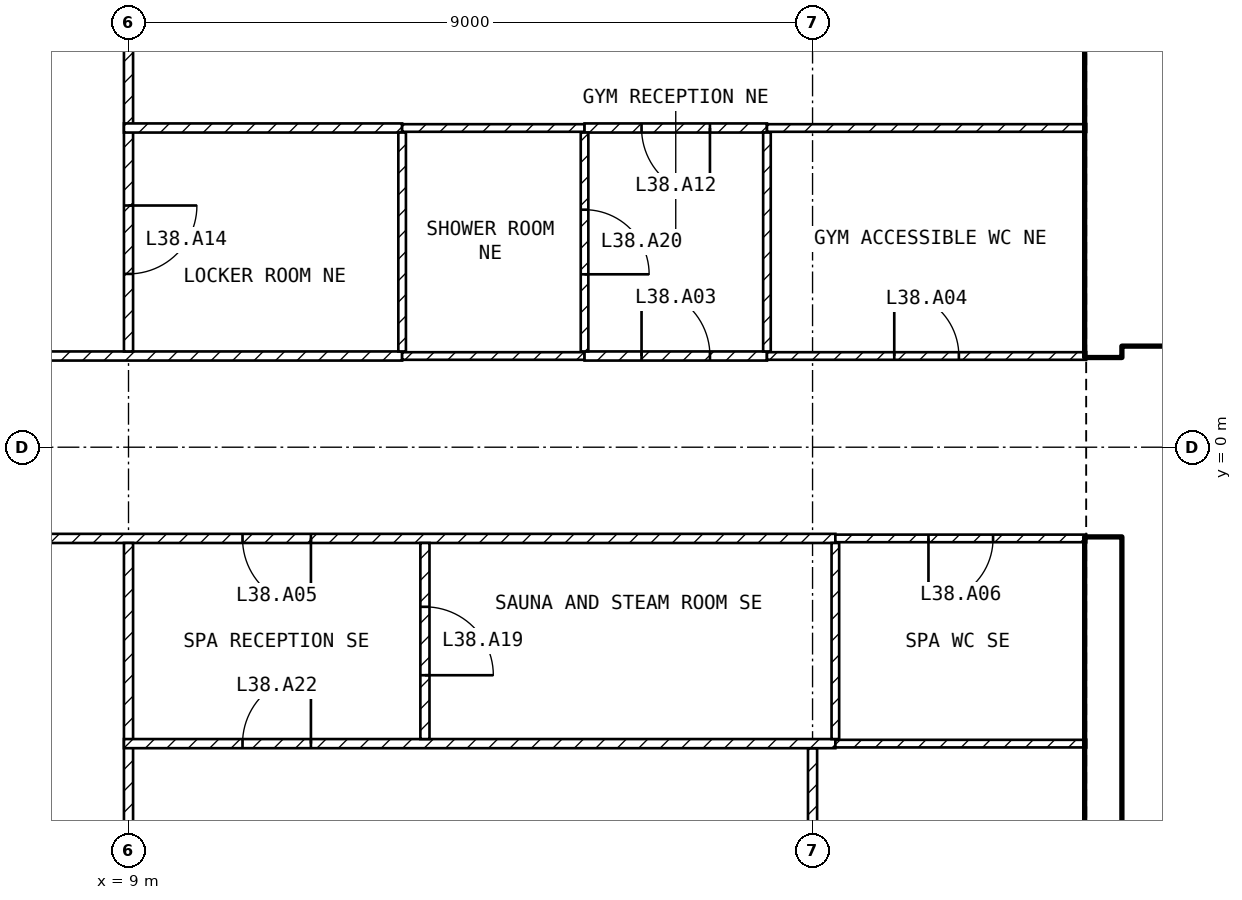
"""IFC4 building model, lengths in metres.
Left out: names, types, materials, properties, quantities, classifications, styles, units other than length and angle.
Written with IfcOpenShell. Run it as: python <this file> out.ifc"""

import sys

from ifc_helpers import new_model, si_unit, direction, frame, frame_2d, origin, place, context, subcontext, project, spatial, rectangle, extrude, element, fill, save


model = new_model("IFC4")
c1 = context("Model", 3, precision=1e-05, world=origin(), true_north=direction((0.0, 1.0)))
c2 = subcontext(c1, "Body", "Model", "MODEL_VIEW")
j1 = project(units=[si_unit("LENGTHUNIT", "METRE"), si_unit("PLANEANGLEUNIT", "RADIAN")], contexts=[c1])
p1 = place(None, origin())
s1 = spatial("IfcSite", under=j1, at=p1, CompositionType="ELEMENT")
p2 = place(p1, origin())
s2 = spatial("IfcBuilding", under=s1, at=p2, CompositionType="ELEMENT")
p3 = place(p2, frame((0.0, 0.0, 154.9)))
s3 = spatial("IfcBuildingStorey", under=s2, at=p3, CompositionType="ELEMENT", Elevation=154.9)
for number, where, z_axis, x_axis in (
    (1, (21.825, -8.1, 0.0), (0.0, 0.0, 1.0), (0.0, 1.0, 0.0)),
    (2, (21.825, 1.2, 0.0), (0.0, 0.0, 1.0), (0.0, 1.0, 0.0)),
):
    element("IfcWall", number, at=place(p3, frame(where, z_axis=z_axis, x_axis=x_axis)), inside=s3, PredefinedType="SHEAR", context=c2, shape_type="SweptSolid", body=[
        extrude(rectangle(XDim=6.9, YDim=0.45, at=frame_2d((3.45, 0.0))), origin(), (0.0, 0.0, 1.0), 6.75),
    ])
p4 = place(p3, frame((22.05, 1.45, 0.0), z_axis=(0.0, 0.0, 1.0), x_axis=(1.0, 0.0, 0.0)))
e3 = element("IfcWall", 3, at=p4, inside=s3, PredefinedType="SOLIDWALL", context=c2, shape_type="SweptSolid", body=[
    extrude(rectangle(XDim=11.0, YDim=0.2, at=frame_2d((5.5, 0.0))), origin(), (0.0, 0.0, 1.0), 6.75),
])
p5 = place(p4, frame((0.75, 0.0, 0.0)))
e4 = element("IfcOpeningElement", 4, at=p5, cuts=e3, PredefinedType="OPENING", context=c2, shape_type="SweptSolid", body=[
    extrude(rectangle(XDim=1.0, YDim=2.1, at=frame_2d((0.5, 1.05))), frame((0.0, 0.11, 0.0), z_axis=(0.0, -1.0, 0.0), x_axis=(1.0, 0.0, 0.0)), (0.0, 0.0, 1.0), 0.22),
])
p6 = place(p4, frame((3.25, 0.0, 0.0)))
e5 = element("IfcOpeningElement", 5, at=p6, cuts=e3, PredefinedType="OPENING", context=c2, shape_type="SweptSolid", body=[
    extrude(rectangle(XDim=1.0, YDim=2.1, at=frame_2d((0.5, 1.05))), frame((0.0, 0.11, 0.0), z_axis=(0.0, -1.0, 0.0), x_axis=(1.0, 0.0, 0.0)), (0.0, 0.0, 1.0), 0.22),
])
p7 = place(p4, frame((9.075, 0.0, 0.0)))
e6 = element("IfcOpeningElement", 6, at=p7, cuts=e3, PredefinedType="OPENING", context=c2, shape_type="SweptSolid", body=[
    extrude(rectangle(XDim=0.9, YDim=2.1, at=frame_2d((0.45, 1.05))), frame((0.0, 0.11, 0.0), z_axis=(0.0, -1.0, 0.0), x_axis=(1.0, 0.0, 0.0)), (0.0, 0.0, 1.0), 0.22),
])
p8 = place(p3, frame((22.05, 5.15, 0.0), z_axis=(0.0, 0.0, 1.0), x_axis=(1.0, 0.0, 0.0)))
e7 = element("IfcWall", 7, at=p8, inside=s3, PredefinedType="SOLIDWALL", context=c2, shape_type="SweptSolid", body=[
    extrude(rectangle(XDim=6.3, YDim=0.2, at=frame_2d((3.15, 0.0))), origin(), (0.0, 0.0, 1.0), 6.75),
])
p9 = place(p8, frame((0.2, 0.0, 0.0)))
e8 = element("IfcOpeningElement", 8, at=p9, cuts=e7, PredefinedType="OPENING", context=c2, shape_type="SweptSolid", body=[
    extrude(rectangle(XDim=1.0, YDim=2.1, at=frame_2d((0.5, 1.05))), frame((0.0, 0.11, 0.0), z_axis=(0.0, -1.0, 0.0), x_axis=(1.0, 0.0, 0.0)), (0.0, 0.0, 1.0), 0.22),
])
p10 = place(p3, frame((-21.6, 1.2, 0.0), z_axis=(0.0, 0.0, 1.0), x_axis=(1.0, 0.0, 0.0)))
e9 = element("IfcWall", 9, at=p10, inside=s3, PredefinedType="PARTITIONING", context=c2, shape_type="SweptSolid", body=[
    extrude(rectangle(XDim=34.2, YDim=0.12, at=frame_2d((17.1, 0.0))), origin(), (0.0, 0.0, 1.0), 6.75),
])
p11 = place(p10, frame((20.7, 0.0, 0.0)))
e10 = element("IfcOpeningElement", 10, at=p11, cuts=e9, PredefinedType="OPENING", context=c2, shape_type="SweptSolid", body=[
    extrude(rectangle(XDim=1.8, YDim=2.1, at=frame_2d((0.9, 1.05))), frame((0.0, 0.07, 0.0), z_axis=(0.0, -1.0, 0.0), x_axis=(1.0, 0.0, 0.0)), (0.0, 0.0, 1.0), 0.14),
])
p12 = place(p10, frame((6.45, 0.0, 0.0)))
e11 = element("IfcOpeningElement", 11, at=p12, cuts=e9, PredefinedType="OPENING", context=c2, shape_type="SweptSolid", body=[
    extrude(rectangle(XDim=0.9, YDim=2.1, at=frame_2d((0.45, 1.05))), frame((0.0, 0.07, 0.0), z_axis=(0.0, -1.0, 0.0), x_axis=(1.0, 0.0, 0.0)), (0.0, 0.0, 1.0), 0.14),
])
p13 = place(p3, frame((18.3, -1.2, 0.0), z_axis=(0.0, 0.0, 1.0), x_axis=(-1.0, 0.0, 0.0)))
e12 = element("IfcWall", 12, at=p13, inside=s3, PredefinedType="PARTITIONING", context=c2, shape_type="SweptSolid", body=[
    extrude(rectangle(XDim=36.3, YDim=0.12, at=frame_2d((18.15, 0.0))), origin(), (0.0, 0.0, 1.0), 6.75),
])
p14 = place(p13, frame((17.4, 0.0, 0.0)))
e13 = element("IfcOpeningElement", 13, at=p14, cuts=e12, PredefinedType="OPENING", context=c2, shape_type="SweptSolid", body=[
    extrude(rectangle(XDim=1.8, YDim=2.1, at=frame_2d((0.9, 1.05))), frame((0.0, 0.07, 0.0), z_axis=(0.0, -1.0, 0.0), x_axis=(1.0, 0.0, 0.0)), (0.0, 0.0, 1.0), 0.14),
])
p15 = place(p13, frame((6.9, 0.0, 0.0)))
e14 = element("IfcOpeningElement", 14, at=p15, cuts=e12, PredefinedType="OPENING", context=c2, shape_type="SweptSolid", body=[
    extrude(rectangle(XDim=0.9, YDim=2.1, at=frame_2d((0.45, 1.05))), frame((0.0, 0.07, 0.0), z_axis=(0.0, -1.0, 0.0), x_axis=(1.0, 0.0, 0.0)), (0.0, 0.0, 1.0), 0.14),
])
p16 = place(p13, frame((30.15, 0.0, 0.0)))
e15 = element("IfcOpeningElement", 15, at=p16, cuts=e12, PredefinedType="OPENING", context=c2, shape_type="SweptSolid", body=[
    extrude(rectangle(XDim=0.9, YDim=2.1, at=frame_2d((0.45, 1.05))), frame((0.0, 0.07, 0.0), z_axis=(0.0, -1.0, 0.0), x_axis=(1.0, 0.0, 0.0)), (0.0, 0.0, 1.0), 0.14),
])
p17 = place(p3, frame((12.6, 1.2, 0.0), z_axis=(0.0, 0.0, 1.0), x_axis=(1.0, 0.0, 0.0)))
e16 = element("IfcWall", 16, at=p17, inside=s3, PredefinedType="PARTITIONING", context=c2, shape_type="SweptSolid", body=[
    extrude(rectangle(XDim=2.4, YDim=0.1, at=frame_2d((1.2, 0.0))), origin(), (0.0, 0.0, 1.0), 6.75),
])
p18 = place(p3, frame((15.0, 1.2, 0.0), z_axis=(0.0, 0.0, 1.0), x_axis=(1.0, 0.0, 0.0)))
e17 = element("IfcWall", 17, at=p18, inside=s3, PredefinedType="PARTITIONING", context=c2, shape_type="SweptSolid", body=[
    extrude(rectangle(XDim=2.4, YDim=0.12, at=frame_2d((1.2, 0.0))), origin(), (0.0, 0.0, 1.0), 6.75),
])
p19 = place(p18, frame((0.75, 0.0, 0.0)))
e18 = element("IfcOpeningElement", 18, at=p19, cuts=e17, PredefinedType="OPENING", context=c2, shape_type="SweptSolid", body=[
    extrude(rectangle(XDim=0.9, YDim=2.1, at=frame_2d((0.45, 1.05))), frame((0.0, 0.07, 0.0), z_axis=(0.0, -1.0, 0.0), x_axis=(1.0, 0.0, 0.0)), (0.0, 0.0, 1.0), 0.14),
])
p20 = place(p3, frame((17.4, 1.2, 0.0), z_axis=(0.0, 0.0, 1.0), x_axis=(1.0, 0.0, 0.0)))
e19 = element("IfcWall", 19, at=p20, inside=s3, PredefinedType="PARTITIONING", context=c2, shape_type="SweptSolid", body=[
    extrude(rectangle(XDim=4.2, YDim=0.1, at=frame_2d((2.1, 0.0))), origin(), (0.0, 0.0, 1.0), 6.75),
])
p21 = place(p20, frame((1.675, 0.0, 0.0)))
e20 = element("IfcOpeningElement", 20, at=p21, cuts=e19, PredefinedType="OPENING", context=c2, shape_type="SweptSolid", body=[
    extrude(rectangle(XDim=0.85, YDim=2.1, at=frame_2d((0.425, 1.05))), frame((0.0, 0.06, 0.0), z_axis=(0.0, -1.0, 0.0), x_axis=(1.0, 0.0, 0.0)), (0.0, 0.0, 1.0), 0.12),
])
p22 = place(p3, frame((21.6, -1.2, 0.0), z_axis=(0.0, 0.0, 1.0), x_axis=(-1.0, 0.0, 0.0)))
e21 = element("IfcWall", 21, at=p22, inside=s3, PredefinedType="PARTITIONING", context=c2, shape_type="SweptSolid", body=[
    extrude(rectangle(XDim=3.3, YDim=0.1, at=frame_2d((1.65, 0.0))), origin(), (0.0, 0.0, 1.0), 6.75),
])
p23 = place(p22, frame((1.225, 0.0, 0.0)))
e22 = element("IfcOpeningElement", 22, at=p23, cuts=e21, PredefinedType="OPENING", context=c2, shape_type="SweptSolid", body=[
    extrude(rectangle(XDim=0.85, YDim=2.1, at=frame_2d((0.425, 1.05))), frame((0.0, 0.06, 0.0), z_axis=(0.0, -1.0, 0.0), x_axis=(1.0, 0.0, 0.0)), (0.0, 0.0, 1.0), 0.12),
])
p24 = place(p3, frame((9.0, 8.92, 0.0), z_axis=(0.0, 0.0, 1.0), x_axis=(0.0, -1.0, 0.0)))
e23 = element("IfcWall", 23, at=p24, inside=s3, PredefinedType="PARTITIONING", context=c2, shape_type="SweptSolid", body=[
    extrude(rectangle(XDim=7.66, YDim=0.12, at=frame_2d((3.83, 0.0))), origin(), (0.0, 0.0, 1.0), 6.75),
])
p25 = place(p24, frame((5.74, 0.0, 0.0)))
e24 = element("IfcOpeningElement", 24, at=p25, cuts=e23, PredefinedType="OPENING", context=c2, shape_type="SweptSolid", body=[
    extrude(rectangle(XDim=0.9, YDim=2.1, at=frame_2d((0.45, 1.05))), frame((0.0, 0.07, 0.0), z_axis=(0.0, -1.0, 0.0), x_axis=(1.0, 0.0, 0.0)), (0.0, 0.0, 1.0), 0.14),
])
p26 = place(p3, frame((9.0, -1.26, 0.0), z_axis=(0.0, 0.0, 1.0), x_axis=(0.0, -1.0, 0.0)))
e25 = element("IfcWall", 25, at=p26, inside=s3, PredefinedType="PARTITIONING", context=c2, shape_type="SweptSolid", body=[
    extrude(rectangle(XDim=7.66, YDim=0.12, at=frame_2d((3.83, 0.0))), origin(), (0.0, 0.0, 1.0), 6.75),
])
p27 = place(p3, frame((12.6, 4.2, 0.0), z_axis=(0.0, 0.0, 1.0), x_axis=(-1.0, 0.0, 0.0)))
e26 = element("IfcWall", 26, at=p27, inside=s3, PredefinedType="PARTITIONING", context=c2, shape_type="SweptSolid", body=[
    extrude(rectangle(XDim=3.66, YDim=0.12, at=frame_2d((1.83, 0.0))), origin(), (0.0, 0.0, 1.0), 6.75),
])
p28 = place(p3, frame((15.0, 4.2, 0.0), z_axis=(0.0, 0.0, 1.0), x_axis=(-1.0, 0.0, 0.0)))
e27 = element("IfcWall", 27, at=p28, inside=s3, PredefinedType="PARTITIONING", context=c2, shape_type="SweptSolid", body=[
    extrude(rectangle(XDim=2.4, YDim=0.1, at=frame_2d((1.2, 0.0))), origin(), (0.0, 0.0, 1.0), 6.75),
])
p29 = place(p3, frame((17.4, 4.2, 0.0), z_axis=(0.0, 0.0, 1.0), x_axis=(-1.0, 0.0, 0.0)))
e28 = element("IfcWall", 28, at=p29, inside=s3, PredefinedType="PARTITIONING", context=c2, shape_type="SweptSolid", body=[
    extrude(rectangle(XDim=2.4, YDim=0.12, at=frame_2d((1.2, 0.0))), origin(), (0.0, 0.0, 1.0), 6.75),
])
p30 = place(p29, frame((0.75, 0.0, 0.0)))
e29 = element("IfcOpeningElement", 29, at=p30, cuts=e28, PredefinedType="OPENING", context=c2, shape_type="SweptSolid", body=[
    extrude(rectangle(XDim=0.9, YDim=2.1, at=frame_2d((0.45, 1.05))), frame((0.0, 0.07, 0.0), z_axis=(0.0, -1.0, 0.0), x_axis=(1.0, 0.0, 0.0)), (0.0, 0.0, 1.0), 0.14),
])
p31 = place(p3, frame((21.6, 4.2, 0.0), z_axis=(0.0, 0.0, 1.0), x_axis=(-1.0, 0.0, 0.0)))
e30 = element("IfcWall", 30, at=p31, inside=s3, PredefinedType="PARTITIONING", context=c2, shape_type="SweptSolid", body=[
    extrude(rectangle(XDim=4.2, YDim=0.1, at=frame_2d((2.1, 0.0))), origin(), (0.0, 0.0, 1.0), 6.75),
])
p32 = place(p3, frame((12.6, 4.14, 0.0), z_axis=(0.0, 0.0, 1.0), x_axis=(0.0, -1.0, 0.0)))
e31 = element("IfcWall", 31, at=p32, inside=s3, PredefinedType="PARTITIONING", context=c2, shape_type="SweptSolid", body=[
    extrude(rectangle(XDim=2.88, YDim=0.1, at=frame_2d((1.44, 0.0))), origin(), (0.0, 0.0, 1.0), 6.75),
])
p33 = place(p3, frame((15.0, 4.14, 0.0), z_axis=(0.0, 0.0, 1.0), x_axis=(0.0, -1.0, 0.0)))
e32 = element("IfcWall", 32, at=p33, inside=s3, PredefinedType="PARTITIONING", context=c2, shape_type="SweptSolid", body=[
    extrude(rectangle(XDim=2.88, YDim=0.1, at=frame_2d((1.44, 0.0))), origin(), (0.0, 0.0, 1.0), 6.75),
])
p34 = place(p33, frame((1.015, 0.0, 0.0)))
e33 = element("IfcOpeningElement", 33, at=p34, cuts=e32, PredefinedType="OPENING", context=c2, shape_type="SweptSolid", body=[
    extrude(rectangle(XDim=0.85, YDim=2.1, at=frame_2d((0.425, 1.05))), frame((0.0, 0.06, 0.0), z_axis=(0.0, -1.0, 0.0), x_axis=(1.0, 0.0, 0.0)), (0.0, 0.0, 1.0), 0.12),
])
p35 = place(p3, frame((17.4, 4.14, 0.0), z_axis=(0.0, 0.0, 1.0), x_axis=(0.0, -1.0, 0.0)))
e34 = element("IfcWall", 34, at=p35, inside=s3, PredefinedType="PARTITIONING", context=c2, shape_type="SweptSolid", body=[
    extrude(rectangle(XDim=2.88, YDim=0.1, at=frame_2d((1.44, 0.0))), origin(), (0.0, 0.0, 1.0), 6.75),
])
p36 = place(p3, frame((18.0, -3.96, 0.0), z_axis=(0.0, 0.0, 1.0), x_axis=(0.0, -1.0, 0.0)))
e35 = element("IfcWall", 35, at=p36, inside=s3, PredefinedType="PARTITIONING", context=c2, shape_type="SweptSolid", body=[
    extrude(rectangle(XDim=4.96, YDim=0.12, at=frame_2d((2.48, 0.0))), origin(), (0.0, 0.0, 1.0), 5.914),
])
p37 = place(p36, frame((1.47, 0.0, 0.0)))
e36 = element("IfcOpeningElement", 36, at=p37, cuts=e35, PredefinedType="OPENING", context=c2, shape_type="SweptSolid", body=[
    extrude(rectangle(XDim=0.9, YDim=2.1, at=frame_2d((0.45, 1.05))), frame((0.0, 0.07, 0.0), z_axis=(0.0, -1.0, 0.0), x_axis=(1.0, 0.0, 0.0)), (0.0, 0.0, 1.0), 0.14),
])
p38 = place(p3, frame((8.94, -3.9, 0.0), z_axis=(0.0, 0.0, 1.0), x_axis=(1.0, 0.0, 0.0)))
e37 = element("IfcWall", 37, at=p38, inside=s3, PredefinedType="PARTITIONING", context=c2, shape_type="SweptSolid", body=[
    extrude(rectangle(XDim=9.36, YDim=0.12, at=frame_2d((4.68, 0.0))), origin(), (0.0, 0.0, 1.0), 6.75),
])
p39 = place(p38, frame((1.56, 0.0, 0.0)))
e38 = element("IfcOpeningElement", 38, at=p39, cuts=e37, PredefinedType="OPENING", context=c2, shape_type="SweptSolid", body=[
    extrude(rectangle(XDim=0.9, YDim=2.1, at=frame_2d((0.45, 1.05))), frame((0.0, 0.07, 0.0), z_axis=(0.0, -1.0, 0.0), x_axis=(1.0, 0.0, 0.0)), (0.0, 0.0, 1.0), 0.14),
])
p40 = place(p3, frame((18.3, -3.9, 0.0), z_axis=(0.0, 0.0, 1.0), x_axis=(1.0, 0.0, 0.0)))
e39 = element("IfcWall", 39, at=p40, inside=s3, PredefinedType="PARTITIONING", context=c2, shape_type="SweptSolid", body=[
    extrude(rectangle(XDim=3.3, YDim=0.1, at=frame_2d((1.65, 0.0))), origin(), (0.0, 0.0, 1.0), 6.75),
])
p41 = place(p3, frame((12.9, -1.26, 0.0), z_axis=(0.0, 0.0, 1.0), x_axis=(0.0, -1.0, 0.0)))
e40 = element("IfcWall", 40, at=p41, inside=s3, PredefinedType="PARTITIONING", context=c2, shape_type="SweptSolid", body=[
    extrude(rectangle(XDim=2.58, YDim=0.12, at=frame_2d((1.29, 0.0))), origin(), (0.0, 0.0, 1.0), 6.217),
])
p42 = place(p41, frame((0.84, 0.0, 0.0)))
e41 = element("IfcOpeningElement", 41, at=p42, cuts=e40, PredefinedType="OPENING", context=c2, shape_type="SweptSolid", body=[
    extrude(rectangle(XDim=0.9, YDim=2.1, at=frame_2d((0.45, 1.05))), frame((0.0, 0.07, 0.0), z_axis=(0.0, -1.0, 0.0), x_axis=(1.0, 0.0, 0.0)), (0.0, 0.0, 1.0), 0.14),
])
p43 = place(p3, frame((18.3, -1.26, 0.0), z_axis=(0.0, 0.0, 1.0), x_axis=(0.0, -1.0, 0.0)))
e42 = element("IfcWall", 42, at=p43, inside=s3, PredefinedType="PARTITIONING", context=c2, shape_type="SweptSolid", body=[
    extrude(rectangle(XDim=2.58, YDim=0.1, at=frame_2d((1.29, 0.0))), origin(), (0.0, 0.0, 1.0), 6.75),
])
p44 = place(p9, origin())
e43 = element("IfcDoor", 43, at=p44, inside=s3, OperationType="SINGLE_SWING_LEFT", PredefinedType="DOOR", context=c2, shape_type="SweptSolid", body=[
    extrude(rectangle(XDim=1.0, YDim=2.1, at=frame_2d((0.5, 1.05))), frame((0.0, 0.025, 0.0), z_axis=(0.0, -1.0, 0.0), x_axis=(1.0, 0.0, 0.0)), (0.0, 0.0, 1.0), 0.05),
])
fill(e8, e43)
p45 = place(p19, origin())
e44 = element("IfcDoor", 44, at=p45, inside=s3, OperationType="SINGLE_SWING_LEFT", PredefinedType="DOOR", context=c2, shape_type="SweptSolid", body=[
    extrude(rectangle(XDim=0.9, YDim=2.1, at=frame_2d((0.45, 1.05))), frame((0.0, 0.025, 0.0), z_axis=(0.0, -1.0, 0.0), x_axis=(1.0, 0.0, 0.0)), (0.0, 0.0, 1.0), 0.05),
])
fill(e18, e44)
p46 = place(p21, origin())
e45 = element("IfcDoor", 45, at=p46, inside=s3, OperationType="SINGLE_SWING_LEFT", PredefinedType="DOOR", context=c2, shape_type="SweptSolid", body=[
    extrude(rectangle(XDim=0.85, YDim=2.1, at=frame_2d((0.425, 1.05))), frame((0.0, 0.025, 0.0), z_axis=(0.0, -1.0, 0.0), x_axis=(1.0, 0.0, 0.0)), (0.0, 0.0, 1.0), 0.05),
])
fill(e20, e45)
p47 = place(p15, origin())
e46 = element("IfcDoor", 46, at=p47, inside=s3, OperationType="SINGLE_SWING_LEFT", PredefinedType="DOOR", context=c2, shape_type="SweptSolid", body=[
    extrude(rectangle(XDim=0.9, YDim=2.1, at=frame_2d((0.45, 1.05))), frame((0.0, 0.025, 0.0), z_axis=(0.0, -1.0, 0.0), x_axis=(1.0, 0.0, 0.0)), (0.0, 0.0, 1.0), 0.05),
])
fill(e14, e46)
p48 = place(p23, origin())
e47 = element("IfcDoor", 47, at=p48, inside=s3, OperationType="SINGLE_SWING_RIGHT", PredefinedType="DOOR", context=c2, shape_type="SweptSolid", body=[
    extrude(rectangle(XDim=0.85, YDim=2.1, at=frame_2d((0.425, 1.05))), frame((0.0, 0.025, 0.0), z_axis=(0.0, -1.0, 0.0), x_axis=(1.0, 0.0, 0.0)), (0.0, 0.0, 1.0), 0.05),
])
fill(e22, e47)
p49 = place(p30, origin())
e48 = element("IfcDoor", 48, at=p49, inside=s3, OperationType="SINGLE_SWING_LEFT", PredefinedType="DOOR", context=c2, shape_type="SweptSolid", body=[
    extrude(rectangle(XDim=0.9, YDim=2.1, at=frame_2d((0.45, 1.05))), frame((0.0, 0.025, 0.0), z_axis=(0.0, -1.0, 0.0), x_axis=(1.0, 0.0, 0.0)), (0.0, 0.0, 1.0), 0.05),
])
fill(e29, e48)
p50 = place(p25, origin())
e49 = element("IfcDoor", 49, at=p50, inside=s3, OperationType="SINGLE_SWING_LEFT", PredefinedType="DOOR", context=c2, shape_type="SweptSolid", body=[
    extrude(rectangle(XDim=0.9, YDim=2.1, at=frame_2d((0.45, 1.05))), frame((0.0, 0.025, 0.0), z_axis=(0.0, -1.0, 0.0), x_axis=(1.0, 0.0, 0.0)), (0.0, 0.0, 1.0), 0.05),
])
fill(e24, e49)
p51 = place(p42, origin())
e50 = element("IfcDoor", 50, at=p51, inside=s3, OperationType="SINGLE_SWING_RIGHT", PredefinedType="DOOR", context=c2, shape_type="SweptSolid", body=[
    extrude(rectangle(XDim=0.9, YDim=2.1, at=frame_2d((0.45, 1.05))), frame((0.0, 0.025, 0.0), z_axis=(0.0, -1.0, 0.0), x_axis=(1.0, 0.0, 0.0)), (0.0, 0.0, 1.0), 0.05),
])
fill(e41, e50)
p52 = place(p34, origin())
e51 = element("IfcDoor", 51, at=p52, inside=s3, OperationType="SINGLE_SWING_RIGHT", PredefinedType="DOOR", context=c2, shape_type="SweptSolid", body=[
    extrude(rectangle(XDim=0.85, YDim=2.1, at=frame_2d((0.425, 1.05))), frame((0.0, 0.025, 0.0), z_axis=(0.0, -1.0, 0.0), x_axis=(1.0, 0.0, 0.0)), (0.0, 0.0, 1.0), 0.05),
])
fill(e33, e51)
p53 = place(p39, origin())
e52 = element("IfcDoor", 52, at=p53, inside=s3, OperationType="SINGLE_SWING_RIGHT", PredefinedType="DOOR", context=c2, shape_type="SweptSolid", body=[
    extrude(rectangle(XDim=0.9, YDim=2.1, at=frame_2d((0.45, 1.05))), frame((0.0, 0.025, 0.0), z_axis=(0.0, -1.0, 0.0), x_axis=(1.0, 0.0, 0.0)), (0.0, 0.0, 1.0), 0.05),
])
fill(e38, e52)
save(model, sys.argv[1])
